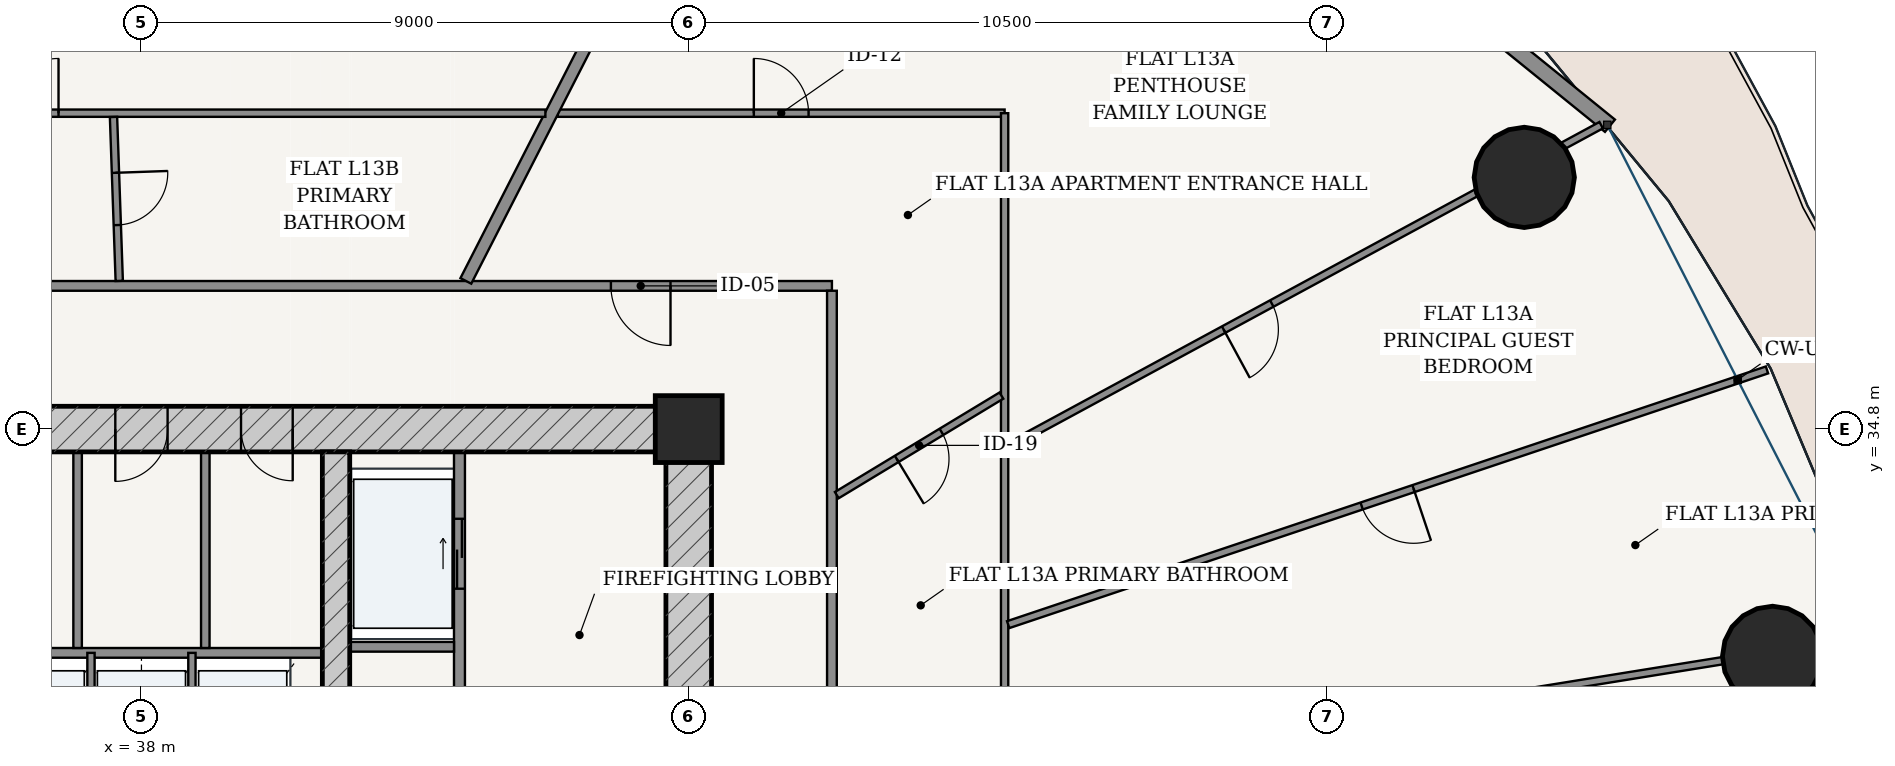
"""IFC4 building model, lengths in metres.
Left out: names, types, materials, properties, quantities, classifications, styles, units other than length and angle.
Written with IfcOpenShell. Run it as: python <this file> out.ifc"""

import sys

from ifc_helpers import new_model, si_unit, direction, frame, frame_2d, origin, origin_2d, place, context, subcontext, project, spatial, rectangle, hollow_circle, extrude, source, transform, mapped, element, fill, save


model = new_model("IFC4")
c1 = context("Model", 3, precision=1e-05, world=origin(), true_north=direction((-0.2419218956, 0.970295726276)))
c2 = subcontext(c1, "Body", "Model", "MODEL_VIEW")
j1 = project(units=[si_unit("LENGTHUNIT", "METRE"), si_unit("PLANEANGLEUNIT", "RADIAN")], contexts=[c1])
p1 = place(None, origin())
s1 = spatial("IfcSite", under=j1, at=p1, CompositionType="ELEMENT")
p2 = place(p1, origin())
s2 = spatial("IfcBuilding", under=s1, at=p2, CompositionType="ELEMENT")
p3 = place(p2, frame((0.0, 0.0, 52.8)))
s3 = spatial("IfcBuildingStorey", under=s2, at=p3, CompositionType="ELEMENT", Elevation=52.8)
p4 = place(p3, frame((47.0, 34.8, 0.0), z_axis=(0.0, 0.0, 1.0), x_axis=(1.0, 0.0, 0.0)))
e1 = element("IfcColumn", 1, at=p4, inside=s3, PredefinedType="COLUMN", context=c2, shape_type="SweptSolid", body=[
    extrude(rectangle(XDim=1.1, YDim=1.1, at=origin_2d()), origin(), (0.0, 0.0, 1.0), 3.6),
])
p5 = place(p3, frame((28.625, 34.8, 0.0), z_axis=(0.0, 0.0, 1.0), x_axis=(1.0, 0.0, 0.0)))
e2 = element("IfcWall", 2, at=p5, inside=s3, PredefinedType="SHEAR", context=c2, shape_type="SweptSolid", body=[
    extrude(rectangle(XDim=18.75, YDim=0.75, at=frame_2d((9.375, 0.0))), origin(), (0.0, 0.0, 1.0), 3.32),
])
p6 = place(p5, frame((6.887, 0.0, 0.0)))
e3 = element("IfcOpeningElement", 3, at=p6, cuts=e2, PredefinedType="OPENING", context=c2, shape_type="SweptSolid", body=[
    extrude(rectangle(XDim=0.85, YDim=2.1, at=frame_2d((0.425, 1.05))), frame((0.0, 0.385, 0.0), z_axis=(0.0, -1.0, 0.0), x_axis=(1.0, 0.0, 0.0)), (0.0, 0.0, 1.0), 0.77),
])
p7 = place(p5, frame((8.945, 0.0, 0.0)))
e4 = element("IfcOpeningElement", 4, at=p7, cuts=e2, PredefinedType="OPENING", context=c2, shape_type="SweptSolid", body=[
    extrude(rectangle(XDim=0.86, YDim=2.1, at=frame_2d((0.43, 1.05))), frame((0.0, 0.385, 0.0), z_axis=(0.0, -1.0, 0.0), x_axis=(1.0, 0.0, 0.0)), (0.0, 0.0, 1.0), 0.77),
])
p8 = place(p5, frame((11.012, 0.0, 0.0)))
e5 = element("IfcOpeningElement", 5, at=p8, cuts=e2, PredefinedType="OPENING", context=c2, shape_type="SweptSolid", body=[
    extrude(rectangle(XDim=0.85, YDim=2.1, at=frame_2d((0.425, 1.05))), frame((0.0, 0.385, 0.0), z_axis=(0.0, -1.0, 0.0), x_axis=(1.0, 0.0, 0.0)), (0.0, 0.0, 1.0), 0.77),
])
p9 = place(p3, frame((47.0, 19.175, 0.0), z_axis=(0.0, 0.0, 1.0), x_axis=(0.0, 1.0, 0.0)))
e6 = element("IfcWall", 6, at=p9, inside=s3, PredefinedType="SHEAR", context=c2, shape_type="SweptSolid", body=[
    extrude(rectangle(XDim=15.25, YDim=0.75, at=frame_2d((7.625, 0.0))), origin(), (0.0, 0.0, 1.0), 3.32),
])
p10 = place(p9, frame((9.875, 0.0, 0.0)))
e7 = element("IfcOpeningElement", 7, at=p10, cuts=e6, PredefinedType="OPENING", context=c2, shape_type="SweptSolid", body=[
    extrude(rectangle(XDim=1.5, YDim=2.2, at=frame_2d((0.75, 1.1))), frame((0.0, 0.385, 0.0), z_axis=(0.0, -1.0, 0.0), x_axis=(1.0, 0.0, 0.0)), (0.0, 0.0, 1.0), 0.77),
])
p11 = place(p3, frame((41.2, 19.175, 0.0), z_axis=(0.0, 0.0, 1.0), x_axis=(0.0, 1.0, 0.0)))
e8 = element("IfcWall", 8, at=p11, inside=s3, PredefinedType="SHEAR", context=c2, shape_type="SweptSolid", body=[
    extrude(rectangle(XDim=15.25, YDim=0.45, at=frame_2d((7.625, 0.0))), origin(), (0.0, 0.0, 1.0), 3.32),
])
p12 = place(p11, frame((7.8, 0.0, 0.0)))
e9 = element("IfcOpeningElement", 9, at=p12, cuts=e8, PredefinedType="OPENING", context=c2, shape_type="SweptSolid", body=[
    extrude(rectangle(XDim=1.05, YDim=2.15, at=frame_2d((0.525, 1.075))), frame((0.0, 0.235, 0.0), z_axis=(0.0, -1.0, 0.0), x_axis=(1.0, 0.0, 0.0)), (0.0, 0.0, 1.0), 0.47),
])
for number, where, z_axis, x_axis in (
    (10, (64.824, 31.063, 0.0), (0.0, 0.0, 1.0), (1.0, 0.0, 0.0)),
    (11, (60.741, 38.939, 0.0), (0.0, 0.0, 1.0), (1.0, 0.0, 0.0)),
):
    element("IfcColumn", number, at=place(p3, frame(where, z_axis=z_axis, x_axis=x_axis)), inside=s3, PredefinedType="COLUMN", context=c2, shape_type="SweptSolid", body=[
        extrude(hollow_circle(Radius=0.825, WallThickness=0.05, at=origin_2d()), origin(), (0.0, 0.0, 1.0), 3.6),
    ])
p13 = place(p3, frame((62.15, 39.789, 0.0), z_axis=(0.0, 0.0, 1.0), x_axis=(-0.777005352078, 0.62949398952, 0.0)))
e12 = element("IfcWall", 12, at=p13, inside=s3, PredefinedType="SOLIDWALL", context=c2, shape_type="SweptSolid", body=[
    extrude(rectangle(XDim=10.447, YDim=0.26, at=frame_2d((5.223, 0.0))), origin(), (0.0, 0.0, 1.0), 3.32),
])
p14 = place(p13, frame((4.548, 0.0, 0.0)))
e13 = element("IfcOpeningElement", 13, at=p14, cuts=e12, PredefinedType="OPENING", context=c2, shape_type="SweptSolid", body=[
    extrude(rectangle(XDim=1.35, YDim=2.2, at=frame_2d((0.675, 1.1))), frame((0.0, 0.14, 0.0), z_axis=(0.0, -1.0, 0.0), x_axis=(1.0, 0.0, 0.0)), (0.0, 0.0, 1.0), 0.28),
])
p15 = place(p3, frame((43.23, 28.52, 0.0), z_axis=(0.0, 0.0, 1.0), x_axis=(0.0, 1.0, 0.0)))
e14 = element("IfcWall", 14, at=p15, inside=s3, PredefinedType="PARTITIONING", context=c2, shape_type="SweptSolid", body=[
    extrude(rectangle(XDim=5.905, YDim=0.18, at=frame_2d((2.953, 0.0))), origin(), (0.0, 0.0, 1.0), 3.32),
])
p16 = place(p15, frame((0.905, 0.0, 0.0)))
e15 = element("IfcOpeningElement", 15, at=p16, cuts=e14, PredefinedType="OPENING", context=c2, shape_type="SweptSolid", body=[
    extrude(rectangle(XDim=0.85, YDim=2.1, at=frame_2d((0.425, 1.05))), frame((0.0, 0.1, 0.0), z_axis=(0.0, -1.0, 0.0), x_axis=(1.0, 0.0, 0.0)), (0.0, 0.0, 1.0), 0.2),
])
p17 = place(p15, frame((3.655, 0.0, 0.0)))
e16 = element("IfcOpeningElement", 16, at=p17, cuts=e14, PredefinedType="OPENING", context=c2, shape_type="SweptSolid", body=[
    extrude(rectangle(XDim=1.15, YDim=2.2, at=frame_2d((0.575, 1.1))), frame((0.0, 0.1, 0.0), z_axis=(0.0, -1.0, 0.0), x_axis=(1.0, 0.0, 0.0)), (0.0, 0.0, 1.0), 0.2),
])
p18 = place(p3, frame((41.425, 31.22, 0.0), z_axis=(0.0, 0.0, 1.0), x_axis=(1.0, 0.0, 0.0)))
e17 = element("IfcWall", 17, at=p18, inside=s3, PredefinedType="PARTITIONING", context=c2, shape_type="SweptSolid", body=[
    extrude(rectangle(XDim=1.715, YDim=0.16, at=frame_2d((0.857, 0.0))), origin(), (0.0, 0.0, 1.0), 3.32),
])
p19 = place(p3, frame((35.025, 31.12, 0.0), z_axis=(0.0, 0.0, 1.0), x_axis=(1.0, 0.0, 0.0)))
e18 = element("IfcWall", 18, at=p19, inside=s3, PredefinedType="PARTITIONING", context=c2, shape_type="SweptSolid", body=[
    extrude(rectangle(XDim=5.95, YDim=0.16, at=frame_2d((2.975, 0.0))), origin(), (0.0, 0.0, 1.0), 3.32),
])
for number, where, z_axis, x_axis in (
    (19, (37.17, 28.56, 0.0), (0.0, 0.0, 1.0), (0.0, 1.0, 0.0)),
    (20, (38.83, 28.56, 0.0), (0.0, 0.0, 1.0), (0.0, 1.0, 0.0)),
):
    element("IfcWall", number, at=place(p3, frame(where, z_axis=z_axis, x_axis=x_axis)), inside=s3, PredefinedType="PARTITIONING", context=c2, shape_type="SweptSolid", body=[
        extrude(rectangle(XDim=2.56, YDim=0.12, at=frame_2d((1.28, 0.0))), origin(), (0.0, 0.0, 1.0), 3.32),
    ])
for number, where, z_axis, x_axis in (
    (21, (36.95, 31.2, 0.0), (0.0, 0.0, 1.0), (0.0, 1.0, 0.0)),
    (22, (39.05, 31.2, 0.0), (0.0, 0.0, 1.0), (0.0, 1.0, 0.0)),
):
    element("IfcWall", number, at=place(p3, frame(where, z_axis=z_axis, x_axis=x_axis)), inside=s3, PredefinedType="PARTITIONING", context=c2, shape_type="SweptSolid", body=[
        extrude(rectangle(XDim=3.225, YDim=0.14, at=frame_2d((1.613, 0.0))), origin(), (0.0, 0.0, 1.0), 3.32),
    ])
p20 = place(p3, frame((26.645, 37.155, 0.0), z_axis=(0.0, 0.0, 1.0), x_axis=(1.0, 0.0, 0.0)))
e23 = element("IfcWall", 23, at=p20, inside=s3, PredefinedType="PARTITIONING", context=c2, shape_type="SweptSolid", body=[
    extrude(rectangle(XDim=22.71, YDim=0.16, at=frame_2d((11.355, 0.0))), origin(), (0.0, 0.0, 1.0), 2.688),
])
p21 = place(p20, frame((19.075, 0.0, 0.0)))
e24 = element("IfcOpeningElement", 24, at=p21, cuts=e23, PredefinedType="OPENING", context=c2, shape_type="SweptSolid", body=[
    extrude(rectangle(XDim=0.98, YDim=2.2, at=frame_2d((0.49, 1.1))), frame((0.0, 0.09, 0.0), z_axis=(0.0, -1.0, 0.0), x_axis=(1.0, 0.0, 0.0)), (0.0, 0.0, 1.0), 0.18),
])
p22 = place(p20, frame((6.221, 0.0, 0.0)))
e25 = element("IfcOpeningElement", 25, at=p22, cuts=e23, PredefinedType="OPENING", context=c2, shape_type="SweptSolid", body=[
    extrude(rectangle(XDim=0.98, YDim=2.2, at=frame_2d((0.49, 1.1))), frame((0.0, 0.09, 0.0), z_axis=(0.0, -1.0, 0.0), x_axis=(1.0, 0.0, 0.0)), (0.0, 0.0, 1.0), 0.18),
])
p23 = place(p3, frame((49.355, 16.525, 0.0), z_axis=(0.0, 0.0, 1.0), x_axis=(0.0, 1.0, 0.0)))
e26 = element("IfcWall", 26, at=p23, inside=s3, PredefinedType="PARTITIONING", context=c2, shape_type="SweptSolid", body=[
    extrude(rectangle(XDim=20.55, YDim=0.16, at=frame_2d((10.275, 0.0))), origin(), (0.0, 0.0, 1.0), 2.688),
])
p24 = place(p3, frame((44.847, 39.995, 0.0), z_axis=(0.0, 0.0, 1.0), x_axis=(1.0, 0.0, 0.0)))
e27 = element("IfcWall", 27, at=p24, inside=s3, PredefinedType="PARTITIONING", context=c2, shape_type="SweptSolid", body=[
    extrude(rectangle(XDim=7.348, YDim=0.12, at=frame_2d((3.674, 0.0))), origin(), (0.0, 0.0, 1.0), 2.688),
])
p25 = place(p24, frame((3.224, 0.0, 0.0)))
e28 = element("IfcOpeningElement", 28, at=p25, cuts=e27, PredefinedType="OPENING", context=c2, shape_type="SweptSolid", body=[
    extrude(rectangle(XDim=0.9, YDim=2.15, at=frame_2d((0.45, 1.075))), frame((0.0, 0.07, 0.0), z_axis=(0.0, -1.0, 0.0), x_axis=(1.0, 0.0, 0.0)), (0.0, 0.0, 1.0), 0.14),
])
p26 = place(p3, frame((52.195, 39.995, 0.0), z_axis=(0.0, 0.0, 1.0), x_axis=(0.0, -1.0, 0.0)))
e29 = element("IfcWall", 29, at=p26, inside=s3, PredefinedType="PARTITIONING", context=c2, shape_type="SweptSolid", body=[
    extrude(rectangle(XDim=20.779, YDim=0.12, at=frame_2d((10.39, 0.0))), origin(), (0.0, 0.0, 1.0), 2.688),
])
p27 = place(p26, frame((13.944, 0.0, 0.0)))
e30 = element("IfcOpeningElement", 30, at=p27, cuts=e29, PredefinedType="OPENING", context=c2, shape_type="SweptSolid", body=[
    extrude(rectangle(XDim=0.9, YDim=2.15, at=frame_2d((0.45, 1.075))), frame((0.0, 0.07, 0.0), z_axis=(0.0, -1.0, 0.0), x_axis=(1.0, 0.0, 0.0)), (0.0, 0.0, 1.0), 0.14),
])
p28 = place(p26, frame((17.655, 0.0, 0.0)))
e31 = element("IfcOpeningElement", 31, at=p28, cuts=e29, PredefinedType="OPENING", context=c2, shape_type="SweptSolid", body=[
    extrude(rectangle(XDim=0.9, YDim=2.15, at=frame_2d((0.45, 1.075))), frame((0.0, 0.07, 0.0), z_axis=(0.0, -1.0, 0.0), x_axis=(1.0, 0.0, 0.0)), (0.0, 0.0, 1.0), 0.14),
])
p29 = place(p3, frame((52.256, 29.098, 0.0), z_axis=(0.0, 0.0, 1.0), x_axis=(0.987257017041, 0.159133850272, 0.0)))
e32 = element("IfcWall", 32, at=p29, inside=s3, PredefinedType="PARTITIONING", context=c2, shape_type="SweptSolid", body=[
    extrude(rectangle(XDim=14.248, YDim=0.12, at=frame_2d((7.124, 0.0))), origin(), (0.0, 0.0, 1.0), 2.688),
])
p30 = place(p29, frame((5.603, 0.0, 0.0)))
e33 = element("IfcOpeningElement", 33, at=p30, cuts=e32, PredefinedType="OPENING", context=c2, shape_type="SweptSolid", body=[
    extrude(rectangle(XDim=0.9, YDim=2.15, at=frame_2d((0.45, 1.075))), frame((0.0, 0.07, 0.0), z_axis=(0.0, -1.0, 0.0), x_axis=(1.0, 0.0, 0.0)), (0.0, 0.0, 1.0), 0.14),
])
p31 = place(p3, frame((52.254, 31.584, 0.0), z_axis=(0.0, 0.0, 1.0), x_axis=(0.948022802246, 0.318202398516, 0.0)))
e34 = element("IfcWall", 34, at=p31, inside=s3, PredefinedType="PARTITIONING", context=c2, shape_type="SweptSolid", body=[
    extrude(rectangle(XDim=13.163, YDim=0.12, at=frame_2d((6.582, 0.0))), origin(), (0.0, 0.0, 1.0), 2.762),
])
p32 = place(p31, frame((6.131, 0.0, 0.0)))
e35 = element("IfcOpeningElement", 35, at=p32, cuts=e34, PredefinedType="OPENING", context=c2, shape_type="SweptSolid", body=[
    extrude(rectangle(XDim=0.9, YDim=2.15, at=frame_2d((0.45, 1.075))), frame((0.0, 0.07, 0.0), z_axis=(0.0, -1.0, 0.0), x_axis=(1.0, 0.0, 0.0)), (0.0, 0.0, 1.0), 0.14),
])
p33 = place(p3, frame((52.25, 34.515, 0.0), z_axis=(0.0, 0.0, 1.0), x_axis=(0.879370672984, 0.476137815654, 0.0)))
e36 = element("IfcWall", 36, at=p33, inside=s3, PredefinedType="PARTITIONING", context=c2, shape_type="SweptSolid", body=[
    extrude(rectangle(XDim=11.094, YDim=0.12, at=frame_2d((5.547, 0.0))), origin(), (0.0, 0.0, 1.0), 2.688),
])
p34 = place(p33, frame((4.034, 0.0, 0.0)))
e37 = element("IfcOpeningElement", 37, at=p34, cuts=e36, PredefinedType="OPENING", context=c2, shape_type="SweptSolid", body=[
    extrude(rectangle(XDim=0.9, YDim=2.15, at=frame_2d((0.45, 1.075))), frame((0.0, 0.07, 0.0), z_axis=(0.0, -1.0, 0.0), x_axis=(1.0, 0.0, 0.0)), (0.0, 0.0, 1.0), 0.14),
])
p35 = place(p3, frame((49.435, 33.714, 0.0), z_axis=(0.0, 0.0, 1.0), x_axis=(0.855724035959, 0.517432482824, 0.0)))
e38 = element("IfcWall", 38, at=p35, inside=s3, PredefinedType="PARTITIONING", context=c2, shape_type="SweptSolid", body=[
    extrude(rectangle(XDim=3.163, YDim=0.12, at=frame_2d((1.582, 0.0))), origin(), (0.0, 0.0, 1.0), 3.32),
])
p36 = place(p35, frame((1.152, 0.0, 0.0)))
e39 = element("IfcOpeningElement", 39, at=p36, cuts=e38, PredefinedType="OPENING", context=c2, shape_type="SweptSolid", body=[
    extrude(rectangle(XDim=0.86, YDim=2.15, at=frame_2d((0.43, 1.075))), frame((0.0, 0.07, 0.0), z_axis=(0.0, -1.0, 0.0), x_axis=(1.0, 0.0, 0.0)), (0.0, 0.0, 1.0), 0.14),
])
p37 = place(p3, frame((43.335, 37.237, 0.0), z_axis=(0.0, 0.0, 1.0), x_axis=(0.455148959499, 0.890415310216, 0.0)))
e40 = element("IfcWall", 40, at=p37, inside=s3, PredefinedType="PARTITIONING", context=c2, shape_type="SweptSolid", body=[
    extrude(rectangle(XDim=12.598, YDim=0.2, at=frame_2d((6.299, 0.0))), origin(), (0.0, 0.0, 1.0), 2.762),
])
p38 = place(p3, frame((23.805, 39.995, 0.0), z_axis=(0.0, 0.0, 1.0), x_axis=(1.0, 0.0, 0.0)))
e41 = element("IfcWall", 41, at=p38, inside=s3, PredefinedType="PARTITIONING", context=c2, shape_type="SweptSolid", body=[
    extrude(rectangle(XDim=20.838, YDim=0.12, at=frame_2d((10.419, 0.0))), origin(), (0.0, 0.0, 1.0), 2.688),
])
p39 = place(p38, frame((11.931, 0.0, 0.0)))
e42 = element("IfcOpeningElement", 42, at=p39, cuts=e41, PredefinedType="OPENING", context=c2, shape_type="SweptSolid", body=[
    extrude(rectangle(XDim=0.9, YDim=2.15, at=frame_2d((0.45, 1.075))), frame((0.0, 0.07, 0.0), z_axis=(0.0, -1.0, 0.0), x_axis=(1.0, 0.0, 0.0)), (0.0, 0.0, 1.0), 0.14),
])
p40 = place(p3, frame((37.635, 37.237, 0.0), z_axis=(0.0, 0.0, 1.0), x_axis=(-0.03493293564, 0.999389658746, 0.0)))
e43 = element("IfcWall", 43, at=p40, inside=s3, PredefinedType="PARTITIONING", context=c2, shape_type="SweptSolid", body=[
    extrude(rectangle(XDim=2.698, YDim=0.12, at=frame_2d((1.349, 0.0))), origin(), (0.0, 0.0, 1.0), 3.32),
])
p41 = place(p40, frame((0.919, 0.0, 0.0)))
e44 = element("IfcOpeningElement", 44, at=p41, cuts=e43, PredefinedType="OPENING", context=c2, shape_type="SweptSolid", body=[
    extrude(rectangle(XDim=0.86, YDim=2.15, at=frame_2d((0.43, 1.075))), frame((0.0, 0.07, 0.0), z_axis=(0.0, -1.0, 0.0), x_axis=(1.0, 0.0, 0.0)), (0.0, 0.0, 1.0), 0.14),
])
m1 = source(origin(), c2, "Body", "SweptSolid", [
    extrude(rectangle(XDim=0.86, YDim=2.1, at=frame_2d((0.43, 1.05))), frame((0.0, 0.025, 0.0), z_axis=(0.0, -1.0, 0.0), x_axis=(1.0, 0.0, 0.0)), (0.0, 0.0, 1.0), 0.05),
])
p42 = place(p7, frame((0.86, 0.0, 0.0), z_axis=(0.0, 0.0, 1.0), x_axis=(-1.0, 0.0, 0.0)))
e45 = element("IfcDoor", 45, at=p42, inside=s3, OperationType="SINGLE_SWING_RIGHT", PredefinedType="DOOR", context=c2, shape_type="MappedRepresentation", body=[
    mapped(m1, transform((0.0, 0.0, 0.0), scale=1.0)),
])
fill(e4, e45)
m2 = source(origin(), c2, "Body", "SweptSolid", [
    extrude(rectangle(XDim=0.85, YDim=2.1, at=frame_2d((0.425, 1.05))), frame((0.0, 0.025, 0.0), z_axis=(0.0, -1.0, 0.0), x_axis=(1.0, 0.0, 0.0)), (0.0, 0.0, 1.0), 0.05),
])
p43 = place(p8, frame((0.85, 0.0, 0.0), z_axis=(0.0, 0.0, 1.0), x_axis=(-1.0, 0.0, 0.0)))
e46 = element("IfcDoor", 46, at=p43, inside=s3, OperationType="SINGLE_SWING_LEFT", PredefinedType="DOOR", context=c2, shape_type="MappedRepresentation", body=[
    mapped(m2, transform((0.0, 0.0, 0.0), scale=1.0)),
])
fill(e5, e46)
m3 = source(origin(), c2, "Body", "SweptSolid", [
    extrude(rectangle(XDim=1.15, YDim=2.2, at=frame_2d((0.575, 1.1))), frame((0.0, 0.025, 0.0), z_axis=(0.0, -1.0, 0.0), x_axis=(1.0, 0.0, 0.0)), (0.0, 0.0, 1.0), 0.05),
])
p44 = place(p17, origin())
e47 = element("IfcDoor", 47, at=p44, inside=s3, OperationType="DOUBLE_DOOR_SLIDING", PredefinedType="DOOR", context=c2, shape_type="MappedRepresentation", body=[
    mapped(m3, transform((0.0, 0.0, 0.0), scale=1.0)),
])
fill(e16, e47)
m4 = source(origin(), c2, "Body", "SweptSolid", [
    extrude(rectangle(XDim=0.98, YDim=2.2, at=frame_2d((0.49, 1.1))), frame((0.0, 0.025, 0.0), z_axis=(0.0, -1.0, 0.0), x_axis=(1.0, 0.0, 0.0)), (0.0, 0.0, 1.0), 0.05),
])
p45 = place(p21, frame((0.98, 0.0, 0.0), z_axis=(0.0, 0.0, 1.0), x_axis=(-1.0, 0.0, 0.0)))
e48 = element("IfcDoor", 48, at=p45, inside=s3, OperationType="SINGLE_SWING_LEFT", PredefinedType="DOOR", context=c2, shape_type="MappedRepresentation", body=[
    mapped(m4, transform((0.0, 0.0, 0.0), scale=1.0)),
])
fill(e24, e48)
m5 = source(origin(), c2, "Body", "SweptSolid", [
    extrude(rectangle(XDim=0.86, YDim=2.15, at=frame_2d((0.43, 1.075))), frame((0.0, 0.025, 0.0), z_axis=(0.0, -1.0, 0.0), x_axis=(1.0, 0.0, 0.0)), (0.0, 0.0, 1.0), 0.05),
])
p46 = place(p36, frame((0.86, 0.0, 0.0), z_axis=(0.0, 0.0, 1.0), x_axis=(-1.0, 0.0, 0.0)))
e49 = element("IfcDoor", 49, at=p46, inside=s3, OperationType="SINGLE_SWING_RIGHT", PredefinedType="DOOR", context=c2, shape_type="MappedRepresentation", body=[
    mapped(m5, transform((0.0, 0.0, 0.0), scale=1.0)),
])
fill(e39, e49)
m6 = source(origin(), c2, "Body", "SweptSolid", [
    extrude(rectangle(XDim=0.9, YDim=2.15, at=frame_2d((0.45, 1.075))), frame((0.0, 0.025, 0.0), z_axis=(0.0, -1.0, 0.0), x_axis=(1.0, 0.0, 0.0)), (0.0, 0.0, 1.0), 0.05),
])
p47 = place(p25, origin())
e50 = element("IfcDoor", 50, at=p47, inside=s3, OperationType="SINGLE_SWING_LEFT", PredefinedType="DOOR", context=c2, shape_type="MappedRepresentation", body=[
    mapped(m6, transform((0.0, 0.0, 0.0), scale=1.0)),
])
fill(e28, e50)
p48 = place(p34, frame((0.9, 0.0, 0.0), z_axis=(0.0, 0.0, 1.0), x_axis=(-1.0, 0.0, 0.0)))
e51 = element("IfcDoor", 51, at=p48, inside=s3, OperationType="SINGLE_SWING_RIGHT", PredefinedType="DOOR", context=c2, shape_type="MappedRepresentation", body=[
    mapped(m6, transform((0.0, 0.0, 0.0), scale=1.0)),
])
fill(e37, e51)
p49 = place(p32, frame((0.9, 0.0, 0.0), z_axis=(0.0, 0.0, 1.0), x_axis=(-1.0, 0.0, 0.0)))
e52 = element("IfcDoor", 52, at=p49, inside=s3, OperationType="SINGLE_SWING_LEFT", PredefinedType="DOOR", context=c2, shape_type="MappedRepresentation", body=[
    mapped(m6, transform((0.0, 0.0, 0.0), scale=1.0)),
])
fill(e35, e52)
p50 = place(p41, frame((0.86, 0.0, 0.0), z_axis=(0.0, 0.0, 1.0), x_axis=(-1.0, 0.0, 0.0)))
e53 = element("IfcDoor", 53, at=p50, inside=s3, OperationType="SINGLE_SWING_LEFT", PredefinedType="DOOR", context=c2, shape_type="MappedRepresentation", body=[
    mapped(m5, transform((0.0, 0.0, 0.0), scale=1.0)),
])
fill(e44, e53)
p51 = place(p39, origin())
e54 = element("IfcDoor", 54, at=p51, inside=s3, OperationType="SINGLE_SWING_RIGHT", PredefinedType="DOOR", context=c2, shape_type="MappedRepresentation", body=[
    mapped(m6, transform((0.0, 0.0, 0.0), scale=1.0)),
])
fill(e42, e54)
save(model, sys.argv[1])
